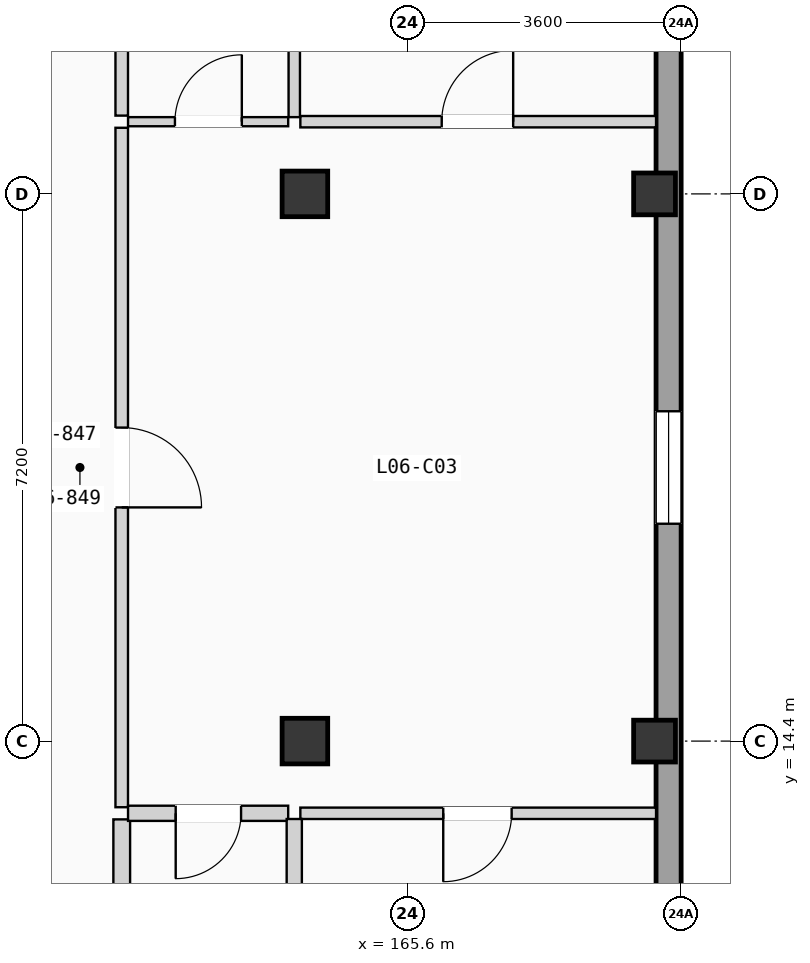
"""IFC4 building model, lengths in metres.
Left out: names, types, materials, properties, quantities, classifications, styles, units other than length and angle.
Written with IfcOpenShell. Run it as: python <this file> out.ifc"""

import sys

from ifc_helpers import new_model, si_unit, direction, frame, frame_2d, origin, origin_2d, place, context, subcontext, project, spatial, rectangle, extrude, element, fill, save


model = new_model("IFC4")
c1 = context("Model", 3, precision=1e-05, world=origin(), true_north=direction((0.0, 1.0)))
c2 = subcontext(c1, "Body", "Model", "MODEL_VIEW")
j1 = project(units=[si_unit("LENGTHUNIT", "METRE"), si_unit("PLANEANGLEUNIT", "RADIAN")], contexts=[c1])
p1 = place(None, origin())
s1 = spatial("IfcSite", under=j1, at=p1, CompositionType="ELEMENT")
p2 = place(p1, origin())
s2 = spatial("IfcBuilding", under=s1, at=p2, CompositionType="ELEMENT")
p3 = place(p2, frame((0.0, 0.0, 21.525)))
s3 = spatial("IfcBuildingStorey", under=s2, at=p3, CompositionType="ELEMENT", Elevation=21.525)
for number, where, z_axis, x_axis in (
    (1, (164.25, 14.4, 0.0), (0.0, 0.0, 1.0), (1.0, 0.0, 0.0)),
    (2, (164.25, 21.6, 0.0), (0.0, 0.0, 1.0), (1.0, 0.0, 0.0)),
):
    element("IfcColumn", number, at=place(p3, frame(where, z_axis=z_axis, x_axis=x_axis)), inside=s3, PredefinedType="COLUMN", context=c2, shape_type="SweptSolid", body=[
        extrude(rectangle(XDim=0.6, YDim=0.6, at=origin_2d()), origin(), (0.0, 0.0, 1.0), 3.15),
    ])
for number, where, z_axis, x_axis in (
    (3, (168.85, 14.4, 0.0), (0.0, 0.0, 1.0), (1.0, 0.0, 0.0)),
    (4, (168.85, 21.6, 0.0), (0.0, 0.0, 1.0), (1.0, 0.0, 0.0)),
):
    element("IfcColumn", number, at=place(p3, frame(where, z_axis=z_axis, x_axis=x_axis)), inside=s3, PredefinedType="COLUMN", context=c2, shape_type="SweptSolid", body=[
        extrude(rectangle(XDim=0.55, YDim=0.55, at=origin_2d()), origin(), (0.0, 0.0, 1.0), 3.15),
    ])
p4 = place(p3, frame((169.035, 0.33, 0.0), z_axis=(0.0, 0.0, 1.0), x_axis=(0.0, 1.0, 0.0)))
e5 = element("IfcWall", 5, at=p4, inside=s3, PredefinedType="SOLIDWALL", context=c2, shape_type="SweptSolid", body=[
    extrude(rectangle(XDim=49.74, YDim=0.33, at=frame_2d((24.87, 0.0))), origin(), (0.0, 0.0, 1.0), 2.89),
])
p5 = place(p4, frame((16.93, 0.0, 0.705)))
e6 = element("IfcOpeningElement", 6, at=p5, cuts=e5, PredefinedType="OPENING", context=c2, shape_type="SweptSolid", body=[
    extrude(rectangle(XDim=1.48, YDim=1.5, at=frame_2d((0.74, 0.75))), frame((0.0, 0.175, 0.0), z_axis=(0.0, -1.0, 0.0), x_axis=(1.0, 0.0, 0.0)), (0.0, 0.0, 1.0), 0.35),
])
p6 = place(p4, frame((9.415, 0.0, 0.555)))
e7 = element("IfcOpeningElement", 7, at=p6, cuts=e5, PredefinedType="OPENING", context=c2, shape_type="SweptSolid", body=[
    extrude(rectangle(XDim=1.48, YDim=1.65, at=frame_2d((0.74, 0.825))), frame((0.0, 0.175, 0.0), z_axis=(0.0, -1.0, 0.0), x_axis=(1.0, 0.0, 0.0)), (0.0, 0.0, 1.0), 0.35),
])
p7 = place(p4, frame((24.775, 0.0, 0.85)))
e8 = element("IfcOpeningElement", 8, at=p7, cuts=e5, PredefinedType="OPENING", context=c2, shape_type="SweptSolid", body=[
    extrude(rectangle(XDim=0.95, YDim=1.2, at=frame_2d((0.475, 0.6))), frame((0.0, 0.175, 0.0), z_axis=(0.0, -1.0, 0.0), x_axis=(1.0, 0.0, 0.0)), (0.0, 0.0, 1.0), 0.35),
])
p8 = place(p4, frame((33.349, 0.0, 0.9)))
e9 = element("IfcOpeningElement", 9, at=p8, cuts=e5, PredefinedType="OPENING", context=c2, shape_type="SweptSolid", body=[
    extrude(rectangle(XDim=1.6, YDim=1.2, at=frame_2d((0.8, 0.6))), frame((0.0, 0.175, 0.0), z_axis=(0.0, -1.0, 0.0), x_axis=(1.0, 0.0, 0.0)), (0.0, 0.0, 1.0), 0.35),
])
p9 = place(p4, frame((29.939, 0.0, 0.855)))
e10 = element("IfcOpeningElement", 10, at=p9, cuts=e5, PredefinedType="OPENING", context=c2, shape_type="SweptSolid", body=[
    extrude(rectangle(XDim=1.6, YDim=1.35, at=frame_2d((0.8, 0.675))), frame((0.0, 0.175, 0.0), z_axis=(0.0, -1.0, 0.0), x_axis=(1.0, 0.0, 0.0)), (0.0, 0.0, 1.0), 0.35),
])
p10 = place(p4, frame((39.541, 0.0, 0.705)))
e11 = element("IfcOpeningElement", 11, at=p10, cuts=e5, PredefinedType="OPENING", context=c2, shape_type="SweptSolid", body=[
    extrude(rectangle(XDim=1.6, YDim=1.5, at=frame_2d((0.8, 0.75))), frame((0.0, 0.175, 0.0), z_axis=(0.0, -1.0, 0.0), x_axis=(1.0, 0.0, 0.0)), (0.0, 0.0, 1.0), 0.35),
])
p11 = place(p3, frame((161.84, 13.53, 0.0), z_axis=(0.0, 0.0, 1.0), x_axis=(0.0, 1.0, 0.0)))
e12 = element("IfcWall", 12, at=p11, inside=s3, PredefinedType="PARTITIONING", context=c2, shape_type="SweptSolid", body=[
    extrude(rectangle(XDim=8.94, YDim=0.165, at=frame_2d((4.47, 0.0))), origin(), (0.0, 0.0, 1.0), 2.87),
])
p12 = place(p11, frame((3.945, 0.0, 0.0)))
e13 = element("IfcOpeningElement", 13, at=p12, cuts=e12, PredefinedType="OPENING", context=c2, shape_type="SweptSolid", body=[
    extrude(rectangle(XDim=1.05, YDim=2.13, at=frame_2d((0.525, 1.065))), frame((0.0, 0.093, 0.0), z_axis=(0.0, -1.0, 0.0), x_axis=(1.0, 0.0, 0.0)), (0.0, 0.0, 1.0), 0.185),
])
p13 = place(p3, frame((161.84, 7.575, 0.0), z_axis=(0.0, 0.0, 1.0), x_axis=(0.0, 1.0, 0.0)))
e14 = element("IfcWall", 14, at=p13, inside=s3, PredefinedType="PLUMBINGWALL", context=c2, shape_type="SweptSolid", body=[
    extrude(rectangle(XDim=5.795, YDim=0.22, at=frame_2d((2.897, 0.0))), origin(), (0.0, 0.0, 1.0), 2.87),
])
p14 = place(p3, frame((161.84, 22.63, 0.0), z_axis=(0.0, 0.0, 1.0), x_axis=(0.0, 1.0, 0.0)))
e15 = element("IfcWall", 15, at=p14, inside=s3, PredefinedType="PARTITIONING", context=c2, shape_type="SweptSolid", body=[
    extrude(rectangle(XDim=6.0, YDim=0.165, at=frame_2d((3.0, 0.0))), origin(), (0.0, 0.0, 1.0), 2.87),
])
p15 = place(p3, frame((161.923, 13.45, 0.0), z_axis=(0.0, 0.0, 1.0), x_axis=(1.0, 0.0, 0.0)))
e16 = element("IfcWall", 16, at=p15, inside=s3, PredefinedType="PLUMBINGWALL", context=c2, shape_type="SweptSolid", body=[
    extrude(rectangle(XDim=2.107, YDim=0.2, at=frame_2d((1.053, 0.0))), origin(), (0.0, 0.0, 1.0), 2.87),
])
p16 = place(p15, frame((0.627, 0.0, 0.0)))
e17 = element("IfcOpeningElement", 17, at=p16, cuts=e16, PredefinedType="OPENING", context=c2, shape_type="SweptSolid", body=[
    extrude(rectangle(XDim=0.86, YDim=2.0, at=frame_2d((0.43, 1.0))), frame((0.0, 0.11, 0.0), z_axis=(0.0, -1.0, 0.0), x_axis=(1.0, 0.0, 0.0)), (0.0, 0.0, 1.0), 0.22),
])
p17 = place(p3, frame((161.923, 22.55, 0.0), z_axis=(0.0, 0.0, 1.0), x_axis=(1.0, 0.0, 0.0)))
e18 = element("IfcWall", 18, at=p17, inside=s3, PredefinedType="PARTITIONING", context=c2, shape_type="SweptSolid", body=[
    extrude(rectangle(XDim=2.107, YDim=0.12, at=frame_2d((1.053, 0.0))), origin(), (0.0, 0.0, 1.0), 2.87),
])
p18 = place(p17, frame((0.617, 0.0, 0.0)))
e19 = element("IfcOpeningElement", 19, at=p18, cuts=e18, PredefinedType="OPENING", context=c2, shape_type="SweptSolid", body=[
    extrude(rectangle(XDim=0.88, YDim=2.02, at=frame_2d((0.44, 1.01))), frame((0.0, 0.07, 0.0), z_axis=(0.0, -1.0, 0.0), x_axis=(1.0, 0.0, 0.0)), (0.0, 0.0, 1.0), 0.14),
])
p19 = place(p3, frame((164.19, 13.45, 0.0), z_axis=(0.0, 0.0, 1.0), x_axis=(1.0, 0.0, 0.0)))
e20 = element("IfcWall", 20, at=p19, inside=s3, PredefinedType="PARTITIONING", context=c2, shape_type="SweptSolid", body=[
    extrude(rectangle(XDim=4.68, YDim=0.15, at=frame_2d((2.34, 0.0))), origin(), (0.0, 0.0, 1.0), 2.87),
])
p20 = place(p19, frame((1.88, 0.0, 0.0)))
e21 = element("IfcOpeningElement", 21, at=p20, cuts=e20, PredefinedType="OPENING", context=c2, shape_type="SweptSolid", body=[
    extrude(rectangle(XDim=0.9, YDim=2.04, at=frame_2d((0.45, 1.02))), frame((0.0, 0.085, 0.0), z_axis=(0.0, -1.0, 0.0), x_axis=(1.0, 0.0, 0.0)), (0.0, 0.0, 1.0), 0.17),
])
p21 = place(p3, frame((164.19, 22.55, 0.0), z_axis=(0.0, 0.0, 1.0), x_axis=(1.0, 0.0, 0.0)))
e22 = element("IfcWall", 22, at=p21, inside=s3, PredefinedType="PARTITIONING", context=c2, shape_type="SweptSolid", body=[
    extrude(rectangle(XDim=4.68, YDim=0.15, at=frame_2d((2.34, 0.0))), origin(), (0.0, 0.0, 1.0), 2.87),
])
p22 = place(p21, frame((1.86, 0.0, 0.0)))
e23 = element("IfcOpeningElement", 23, at=p22, cuts=e22, PredefinedType="OPENING", context=c2, shape_type="SweptSolid", body=[
    extrude(rectangle(XDim=0.94, YDim=2.06, at=frame_2d((0.47, 1.03))), frame((0.0, 0.085, 0.0), z_axis=(0.0, -1.0, 0.0), x_axis=(1.0, 0.0, 0.0)), (0.0, 0.0, 1.0), 0.17),
])
p23 = place(p3, frame((164.11, 7.575, 0.0), z_axis=(0.0, 0.0, 1.0), x_axis=(0.0, 1.0, 0.0)))
e24 = element("IfcWall", 24, at=p23, inside=s3, PredefinedType="PLUMBINGWALL", context=c2, shape_type="SweptSolid", body=[
    extrude(rectangle(XDim=5.8, YDim=0.2, at=frame_2d((2.9, 0.0))), origin(), (0.0, 0.0, 1.0), 2.87),
])
p24 = place(p3, frame((164.11, 22.61, 0.0), z_axis=(0.0, 0.0, 1.0), x_axis=(0.0, 1.0, 0.0)))
e25 = element("IfcWall", 25, at=p24, inside=s3, PredefinedType="PARTITIONING", context=c2, shape_type="SweptSolid", body=[
    extrude(rectangle(XDim=6.02, YDim=0.15, at=frame_2d((3.01, 0.0))), origin(), (0.0, 0.0, 1.0), 2.87),
])
p25 = place(p5, origin())
e26 = element("IfcWindow", 26, at=p25, inside=s3, PartitioningType="SINGLE_PANEL", PredefinedType="WINDOW", context=c2, shape_type="SweptSolid", body=[
    extrude(rectangle(XDim=1.48, YDim=1.5, at=frame_2d((0.74, 0.75))), frame((0.0, 0.03, 0.0), z_axis=(0.0, -1.0, 0.0), x_axis=(1.0, 0.0, 0.0)), (0.0, 0.0, 1.0), 0.06),
])
fill(e6, e26)
p26 = place(p12, frame((1.05, 0.0, 0.0), z_axis=(0.0, 0.0, 1.0), x_axis=(-1.0, 0.0, 0.0)))
e27 = element("IfcDoor", 27, at=p26, inside=s3, OperationType="SINGLE_SWING_LEFT", PredefinedType="DOOR", context=c2, shape_type="SweptSolid", body=[
    extrude(rectangle(XDim=1.05, YDim=2.13, at=frame_2d((0.525, 1.065))), frame((0.0, 0.025, 0.0), z_axis=(0.0, -1.0, 0.0), x_axis=(1.0, 0.0, 0.0)), (0.0, 0.0, 1.0), 0.05),
])
fill(e13, e27)
p27 = place(p16, frame((0.86, 0.0, 0.0), z_axis=(0.0, 0.0, 1.0), x_axis=(-1.0, 0.0, 0.0)))
e28 = element("IfcDoor", 28, at=p27, inside=s3, OperationType="SINGLE_SWING_LEFT", PredefinedType="DOOR", context=c2, shape_type="SweptSolid", body=[
    extrude(rectangle(XDim=0.86, YDim=2.0, at=frame_2d((0.43, 1.0))), frame((0.0, 0.025, 0.0), z_axis=(0.0, -1.0, 0.0), x_axis=(1.0, 0.0, 0.0)), (0.0, 0.0, 1.0), 0.05),
])
fill(e17, e28)
p28 = place(p18, origin())
e29 = element("IfcDoor", 29, at=p28, inside=s3, OperationType="SINGLE_SWING_RIGHT", PredefinedType="DOOR", context=c2, shape_type="SweptSolid", body=[
    extrude(rectangle(XDim=0.88, YDim=2.02, at=frame_2d((0.44, 1.01))), frame((0.0, 0.025, 0.0), z_axis=(0.0, -1.0, 0.0), x_axis=(1.0, 0.0, 0.0)), (0.0, 0.0, 1.0), 0.05),
])
fill(e19, e29)
p29 = place(p20, frame((0.9, 0.0, 0.0), z_axis=(0.0, 0.0, 1.0), x_axis=(-1.0, 0.0, 0.0)))
e30 = element("IfcDoor", 30, at=p29, inside=s3, OperationType="SINGLE_SWING_LEFT", PredefinedType="DOOR", context=c2, shape_type="SweptSolid", body=[
    extrude(rectangle(XDim=0.9, YDim=2.04, at=frame_2d((0.45, 1.02))), frame((0.0, 0.025, 0.0), z_axis=(0.0, -1.0, 0.0), x_axis=(1.0, 0.0, 0.0)), (0.0, 0.0, 1.0), 0.05),
])
fill(e21, e30)
p30 = place(p22, origin())
e31 = element("IfcDoor", 31, at=p30, inside=s3, OperationType="SINGLE_SWING_RIGHT", PredefinedType="DOOR", context=c2, shape_type="SweptSolid", body=[
    extrude(rectangle(XDim=0.94, YDim=2.06, at=frame_2d((0.47, 1.03))), frame((0.0, 0.025, 0.0), z_axis=(0.0, -1.0, 0.0), x_axis=(1.0, 0.0, 0.0)), (0.0, 0.0, 1.0), 0.05),
])
fill(e23, e31)
save(model, sys.argv[1])
